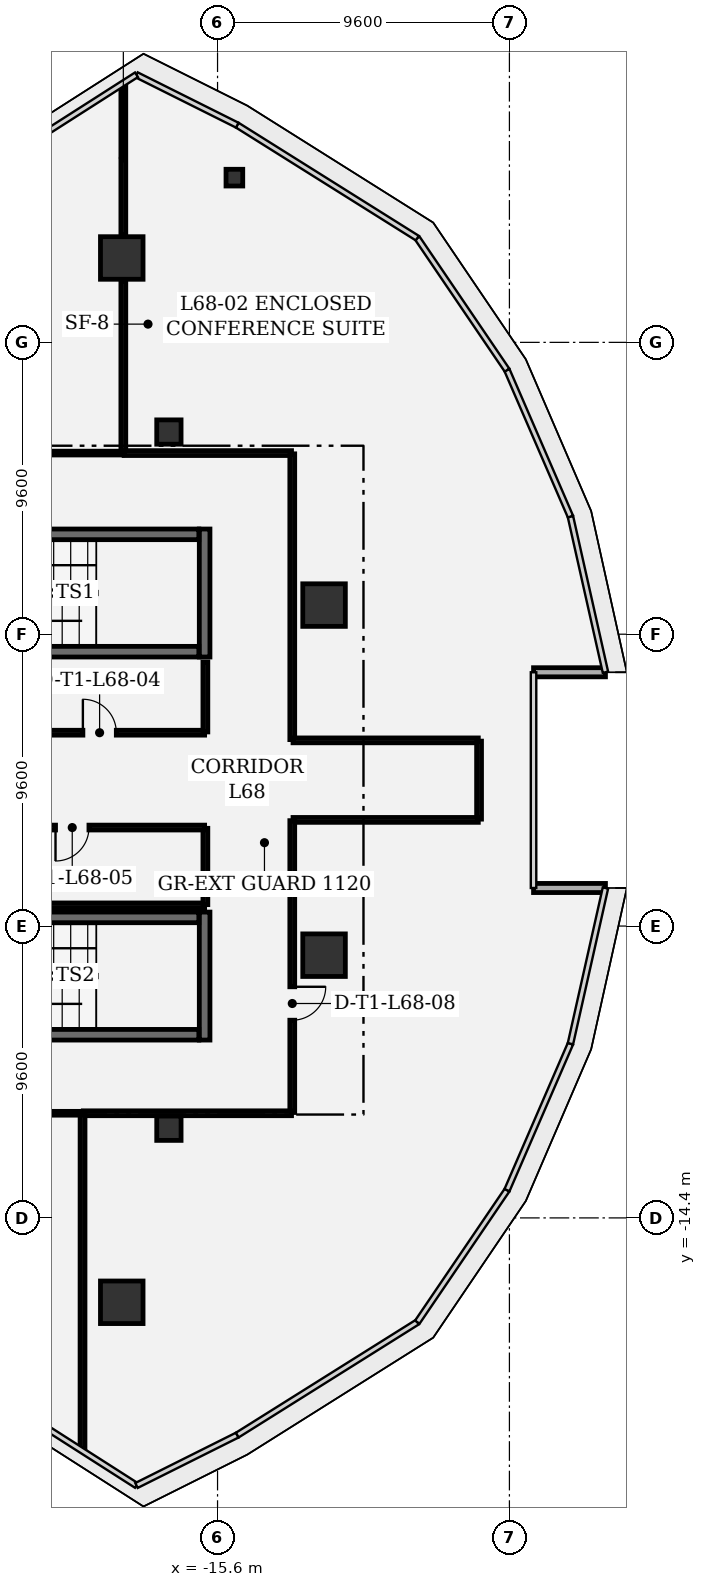
"""IFC4 building model, lengths in metres.
Left out: names, types, materials, properties, quantities, classifications, styles, units other than length and angle.
Written with IfcOpenShell. Run it as: python <this file> out.ifc"""

import sys

from ifc_helpers import new_model, si_unit, direction, frame, frame_2d, origin, origin_2d, place, context, subcontext, project, spatial, rectangle, extrude, element, fill, save


model = new_model("IFC4")
c1 = context("Model", 3, precision=1e-05, world=origin(), true_north=direction((0.0, 1.0)))
c2 = subcontext(c1, "Body", "Model", "MODEL_VIEW")
j1 = project(units=[si_unit("LENGTHUNIT", "METRE"), si_unit("PLANEANGLEUNIT", "RADIAN")], contexts=[c1])
p1 = place(None, origin())
s1 = spatial("IfcSite", under=j1, at=p1, CompositionType="ELEMENT")
p2 = place(p1, origin())
s2 = spatial("IfcBuilding", under=s1, at=p2, CompositionType="ELEMENT")
p3 = place(p2, frame((0.0, 0.0, 293.4)))
s3 = spatial("IfcBuildingStorey", under=s2, at=p3, CompositionType="ELEMENT", Elevation=293.4)
for number, where, z_axis, x_axis in (
    (1, (-18.75, -17.176, 0.0), (0.0, 0.0, 1.0), (1.0, 0.0, 0.0)),
    (2, (-12.097, -5.758, 0.0), (0.0, 0.0, 1.0), (1.0, 0.0, 0.0)),
    (3, (-12.097, 5.758, 0.0), (0.0, 0.0, 1.0), (1.0, 0.0, 0.0)),
    (4, (-18.75, 17.176, 0.0), (0.0, 0.0, 1.0), (1.0, 0.0, 0.0)),
):
    element("IfcColumn", number, at=place(p3, frame(where, z_axis=z_axis, x_axis=x_axis)), inside=s3, PredefinedType="COLUMN", context=c2, shape_type="SweptSolid", body=[
        extrude(rectangle(XDim=1.4, YDim=1.4, at=origin_2d()), origin(), (0.0, 0.0, 1.0), 4.2),
    ])
for number, where, z_axis, x_axis in (
    (5, (-17.2, 11.45, 0.0), (0.0, 0.0, 1.0), (1.0, 0.0, 0.0)),
    (6, (-17.2, -11.45, 0.0), (0.0, 0.0, 1.0), (1.0, 0.0, 0.0)),
):
    element("IfcColumn", number, at=place(p3, frame(where, z_axis=z_axis, x_axis=x_axis)), inside=s3, PredefinedType="COLUMN", context=c2, shape_type="SweptSolid", body=[
        extrude(rectangle(XDim=0.8, YDim=0.8, at=origin_2d()), origin(), (0.0, 0.0, 1.0), 4.2),
    ])
p4 = place(p3, frame((-15.046, 19.818, 0.0), z_axis=(0.0, 0.0, 1.0), x_axis=(1.0, 0.0, 0.0)))
e7 = element("IfcColumn", 7, at=p4, inside=s3, PredefinedType="COLUMN", context=c2, shape_type="SweptSolid", body=[
    extrude(rectangle(XDim=0.55, YDim=0.55, at=origin_2d()), origin(), (0.0, 0.0, 1.0), 4.2),
])
for number, where, z_axis, x_axis in (
    (8, (-2.841, -3.548, 0.0), (0.0, 0.0, 1.0), (-1.0, 0.0, 0.0)),
    (9, (-5.206, 3.548, 0.0), (0.0, 0.0, 1.0), (1.0, 0.0, 0.0)),
):
    element("IfcWall", number, at=place(p3, frame(where, z_axis=z_axis, x_axis=x_axis)), inside=s3, PredefinedType="SOLIDWALL", context=c2, shape_type="SweptSolid", body=[
        extrude(rectangle(XDim=2.365, YDim=0.3, at=frame_2d((1.183, 0.0))), origin(), (0.0, 0.0, 1.0), 3.91),
    ])
p5 = place(p3, frame((-16.025, 4.05, 0.0), z_axis=(0.0, 0.0, 1.0), x_axis=(0.0, 1.0, 0.0)))
e10 = element("IfcWall", 10, at=p5, inside=s3, PredefinedType="SHEAR", context=c2, shape_type="SweptSolid", body=[
    extrude(rectangle(XDim=4.21, YDim=0.35, at=frame_2d((2.105, 0.0))), origin(), (0.0, 0.0, 1.0), 3.91),
])
p6 = place(p3, frame((-24.335, 4.225, 0.0), z_axis=(0.0, 0.0, 1.0), x_axis=(1.0, 0.0, 0.0)))
e11 = element("IfcWall", 11, at=p6, inside=s3, PredefinedType="SHEAR", context=c2, shape_type="SweptSolid", body=[
    extrude(rectangle(XDim=8.12, YDim=0.35, at=frame_2d((4.06, 0.0))), origin(), (0.0, 0.0, 1.0), 3.91),
])
p7 = place(p3, frame((-16.215, 8.085, 0.0), z_axis=(0.0, 0.0, 1.0), x_axis=(-1.0, 0.0, 0.0)))
e12 = element("IfcWall", 12, at=p7, inside=s3, PredefinedType="SHEAR", context=c2, shape_type="SweptSolid", body=[
    extrude(rectangle(XDim=8.12, YDim=0.35, at=frame_2d((4.06, 0.0))), origin(), (0.0, 0.0, 1.0), 3.91),
])
p8 = place(p7, frame((6.74, 0.0, 0.0)))
e13 = element("IfcOpeningElement", 13, at=p8, cuts=e12, PredefinedType="OPENING", context=c2, shape_type="SweptSolid", body=[
    extrude(rectangle(XDim=1.1, YDim=2.2, at=frame_2d((0.55, 1.1))), frame((0.0, 0.185, 0.0), z_axis=(0.0, -1.0, 0.0), x_axis=(1.0, 0.0, 0.0)), (0.0, 0.0, 1.0), 0.37),
])
p9 = place(p3, frame((-16.025, -8.55, 0.0), z_axis=(0.0, 0.0, 1.0), x_axis=(0.0, 1.0, 0.0)))
e14 = element("IfcWall", 14, at=p9, inside=s3, PredefinedType="SHEAR", context=c2, shape_type="SweptSolid", body=[
    extrude(rectangle(XDim=4.21, YDim=0.35, at=frame_2d((2.105, 0.0))), origin(), (0.0, 0.0, 1.0), 3.91),
])
p10 = place(p3, frame((-24.335, -8.375, 0.0), z_axis=(0.0, 0.0, 1.0), x_axis=(1.0, 0.0, 0.0)))
e15 = element("IfcWall", 15, at=p10, inside=s3, PredefinedType="SHEAR", context=c2, shape_type="SweptSolid", body=[
    extrude(rectangle(XDim=8.12, YDim=0.35, at=frame_2d((4.06, 0.0))), origin(), (0.0, 0.0, 1.0), 3.91),
])
p11 = place(p10, frame((0.28, 0.0, 0.0)))
e16 = element("IfcOpeningElement", 16, at=p11, cuts=e15, PredefinedType="OPENING", context=c2, shape_type="SweptSolid", body=[
    extrude(rectangle(XDim=1.1, YDim=2.2, at=frame_2d((0.55, 1.1))), frame((0.0, 0.185, 0.0), z_axis=(0.0, -1.0, 0.0), x_axis=(1.0, 0.0, 0.0)), (0.0, 0.0, 1.0), 0.37),
])
p12 = place(p3, frame((-16.215, -4.515, 0.0), z_axis=(0.0, 0.0, 1.0), x_axis=(-1.0, 0.0, 0.0)))
e17 = element("IfcWall", 17, at=p12, inside=s3, PredefinedType="SHEAR", context=c2, shape_type="SweptSolid", body=[
    extrude(rectangle(XDim=8.12, YDim=0.35, at=frame_2d((4.06, 0.0))), origin(), (0.0, 0.0, 1.0), 3.91),
])
p13 = place(p3, frame((-22.934, 1.56, 0.0), z_axis=(0.0, 0.0, 1.0), x_axis=(1.0, 0.0, 0.0)))
e18 = element("IfcWall", 18, at=p13, inside=s3, PredefinedType="PARTITIONING", context=c2, shape_type="SweptSolid", body=[
    extrude(rectangle(XDim=6.909, YDim=0.16, at=frame_2d((3.455, 0.0))), origin(), (0.0, 0.0, 1.0), 3.91),
])
p14 = place(p13, frame((2.905, 0.0, 0.0)))
e19 = element("IfcOpeningElement", 19, at=p14, cuts=e18, PredefinedType="OPENING", context=c2, shape_type="SweptSolid", body=[
    extrude(rectangle(XDim=1.1, YDim=2.15, at=frame_2d((0.55, 1.075))), frame((0.0, 0.09, 0.0), z_axis=(0.0, -1.0, 0.0), x_axis=(1.0, 0.0, 0.0)), (0.0, 0.0, 1.0), 0.18),
])
p15 = place(p3, frame((-16.0, 1.585, 0.0), z_axis=(0.0, 0.0, 1.0), x_axis=(0.0, 1.0, 0.0)))
e20 = element("IfcWall", 20, at=p15, inside=s3, PredefinedType="PARTITIONING", context=c2, shape_type="SweptSolid", body=[
    extrude(rectangle(XDim=2.302, YDim=0.16, at=frame_2d((1.151, 0.0))), origin(), (0.0, 0.0, 1.0), 3.91),
])
p16 = place(p3, frame((-28.575, -4.12, 0.0), z_axis=(0.0, 0.0, 1.0), x_axis=(1.0, 0.0, 0.0)))
e21 = element("IfcWall", 21, at=p16, inside=s3, PredefinedType="PARTITIONING", context=c2, shape_type="SweptSolid", body=[
    extrude(rectangle(XDim=12.55, YDim=0.16, at=frame_2d((6.275, 0.0))), origin(), (0.0, 0.0, 1.0), 3.91),
])
p17 = place(p3, frame((-16.0, -4.095, 0.0), z_axis=(0.0, 0.0, 1.0), x_axis=(0.0, 1.0, 0.0)))
e22 = element("IfcWall", 22, at=p17, inside=s3, PredefinedType="PARTITIONING", context=c2, shape_type="SweptSolid", body=[
    extrude(rectangle(XDim=2.51, YDim=0.16, at=frame_2d((1.255, 0.0))), origin(), (0.0, 0.0, 1.0), 3.91),
])
p18 = place(p3, frame((-16.025, -1.56, 0.0), z_axis=(0.0, 0.0, 1.0), x_axis=(-1.0, 0.0, 0.0)))
e23 = element("IfcWall", 23, at=p18, inside=s3, PredefinedType="PARTITIONING", context=c2, shape_type="SweptSolid", body=[
    extrude(rectangle(XDim=8.709, YDim=0.16, at=frame_2d((4.354, 0.0))), origin(), (0.0, 0.0, 1.0), 3.91),
])
p19 = place(p18, frame((3.804, 0.0, 0.0)))
e24 = element("IfcOpeningElement", 24, at=p19, cuts=e23, PredefinedType="OPENING", context=c2, shape_type="SweptSolid", body=[
    extrude(rectangle(XDim=1.1, YDim=2.15, at=frame_2d((0.55, 1.075))), frame((0.0, 0.09, 0.0), z_axis=(0.0, -1.0, 0.0), x_axis=(1.0, 0.0, 0.0)), (0.0, 0.0, 1.0), 0.18),
])
p20 = place(p3, frame((-18.699, 22.845, 0.0), z_axis=(0.0, 0.0, 1.0), x_axis=(4.9780964e-05, -0.999999998761, 0.0)))
e25 = element("IfcWall", 25, at=p20, inside=s3, PredefinedType="PARTITIONING", context=c2, shape_type="SweptSolid", body=[
    extrude(rectangle(XDim=4.904, YDim=0.16, at=frame_2d((2.452, 0.0))), origin(), (0.0, 0.0, 1.0), 3.91),
])
p21 = place(p3, frame((-18.698, 16.411, 0.0), z_axis=(0.0, 0.0, 1.0), x_axis=(-4.3383948e-05, -0.999999999059, 0.0)))
e26 = element("IfcWall", 26, at=p21, inside=s3, PredefinedType="PARTITIONING", context=c2, shape_type="SweptSolid", body=[
    extrude(rectangle(XDim=5.627, YDim=0.16, at=frame_2d((2.814, 0.0))), origin(), (0.0, 0.0, 1.0), 3.13),
])
p22 = place(p3, frame((-13.167, 10.758, 0.0), z_axis=(0.0, 0.0, 1.0), x_axis=(-1.0, 0.0, 0.0)))
e27 = element("IfcWall", 27, at=p22, inside=s3, PredefinedType="PARTITIONING", context=c2, shape_type="SweptSolid", body=[
    extrude(rectangle(XDim=5.507, YDim=0.16, at=frame_2d((2.753, 0.0))), origin(), (0.0, 0.0, 1.0), 3.529),
])
p23 = place(p3, frame((-13.142, 10.733, 0.0), z_axis=(0.0, 0.0, 1.0), x_axis=(0.0, -1.0, 0.0)))
e28 = element("IfcWall", 28, at=p23, inside=s3, PredefinedType="PARTITIONING", context=c2, shape_type="SweptSolid", body=[
    extrude(rectangle(XDim=9.4, YDim=0.16, at=frame_2d((4.7, 0.0))), origin(), (0.0, 0.0, 1.0), 3.13),
])
p24 = place(p3, frame((-7.023, 1.308, 0.0), z_axis=(0.0, 0.0, 1.0), x_axis=(-1.0, 0.0, 0.0)))
e29 = element("IfcWall", 29, at=p24, inside=s3, PredefinedType="PARTITIONING", context=c2, shape_type="SweptSolid", body=[
    extrude(rectangle(XDim=6.094, YDim=0.16, at=frame_2d((3.047, 0.0))), origin(), (0.0, 0.0, 1.0), 3.91),
])
p25 = place(p3, frame((-6.998, -1.283, 0.0), z_axis=(0.0, 0.0, 1.0), x_axis=(0.0, 1.0, 0.0)))
e30 = element("IfcWall", 30, at=p25, inside=s3, PredefinedType="PARTITIONING", context=c2, shape_type="SweptSolid", body=[
    extrude(rectangle(XDim=2.566, YDim=0.16, at=frame_2d((1.283, 0.0))), origin(), (0.0, 0.0, 1.0), 3.91),
])
p26 = place(p3, frame((-13.117, -1.308, 0.0), z_axis=(0.0, 0.0, 1.0), x_axis=(1.0, 0.0, 0.0)))
e31 = element("IfcWall", 31, at=p26, inside=s3, PredefinedType="PARTITIONING", context=c2, shape_type="SweptSolid", body=[
    extrude(rectangle(XDim=6.094, YDim=0.16, at=frame_2d((3.047, 0.0))), origin(), (0.0, 0.0, 1.0), 3.91),
])
p27 = place(p3, frame((-13.142, -1.333, 0.0), z_axis=(0.0, 0.0, 1.0), x_axis=(0.0, -1.0, 0.0)))
e32 = element("IfcWall", 32, at=p27, inside=s3, PredefinedType="PARTITIONING", context=c2, shape_type="SweptSolid", body=[
    extrude(rectangle(XDim=9.6, YDim=0.16, at=frame_2d((4.8, 0.0))), origin(), (0.0, 0.0, 1.0), 3.13),
])
p28 = place(p27, frame((5.464, 0.0, 0.0)))
e33 = element("IfcOpeningElement", 33, at=p28, cuts=e32, PredefinedType="OPENING", context=c2, shape_type="SweptSolid", body=[
    extrude(rectangle(XDim=1.1, YDim=2.15, at=frame_2d((0.55, 1.075))), frame((0.0, 0.09, 0.0), z_axis=(0.0, -1.0, 0.0), x_axis=(1.0, 0.0, 0.0)), (0.0, 0.0, 1.0), 0.18),
])
p29 = place(p3, frame((-20.015, -10.958, 0.0), z_axis=(0.0, 0.0, 1.0), x_axis=(1.0, 0.0, 0.0)))
e34 = element("IfcWall", 34, at=p29, inside=s3, PredefinedType="PARTITIONING", context=c2, shape_type="SweptSolid", body=[
    extrude(rectangle(XDim=6.848, YDim=0.16, at=frame_2d((3.424, 0.0))), origin(), (0.0, 0.0, 1.0), 3.529),
])
p30 = place(p3, frame((-20.04, -10.983, 0.0), z_axis=(0.0, 0.0, 1.0), x_axis=(-0.00013312034, -0.999999991139, 0.0)))
e35 = element("IfcWall", 35, at=p30, inside=s3, PredefinedType="PARTITIONING", context=c2, shape_type="SweptSolid", body=[
    extrude(rectangle(XDim=11.004, YDim=0.16, at=frame_2d((5.502, 0.0))), origin(), (0.0, 0.0, 1.0), 3.91),
])
p31 = place(p3, frame((-29.15, 10.758, 0.0), z_axis=(0.0, 0.0, 1.0), x_axis=(1.0, 0.0, 0.0)))
e36 = element("IfcWall", 36, at=p31, inside=s3, PredefinedType="PARTITIONING", context=c2, shape_type="SweptSolid", body=[
    extrude(rectangle(XDim=10.419, YDim=0.125, at=frame_2d((5.209, 0.0))), origin(), (0.0, 0.0, 1.0), 3.13),
])
p32 = place(p31, frame((3.382, 0.0, 0.0)))
e37 = element("IfcOpeningElement", 37, at=p32, cuts=e36, PredefinedType="OPENING", context=c2, shape_type="SweptSolid", body=[
    extrude(rectangle(XDim=0.95, YDim=2.15, at=frame_2d((0.475, 1.075))), frame((0.0, 0.073, 0.0), z_axis=(0.0, -1.0, 0.0), x_axis=(1.0, 0.0, 0.0)), (0.0, 0.0, 1.0), 0.145),
])
p33 = place(p3, frame((-20.073, -10.958, 0.0), z_axis=(0.0, 0.0, 1.0), x_axis=(-1.0, 0.0, 0.0)))
e38 = element("IfcWall", 38, at=p33, inside=s3, PredefinedType="PARTITIONING", context=c2, shape_type="SweptSolid", body=[
    extrude(rectangle(XDim=9.811, YDim=0.125, at=frame_2d((4.905, 0.0))), origin(), (0.0, 0.0, 1.0), 3.13),
])
p34 = place(p33, frame((4.43, 0.0, 0.0)))
e39 = element("IfcOpeningElement", 39, at=p34, cuts=e38, PredefinedType="OPENING", context=c2, shape_type="SweptSolid", body=[
    extrude(rectangle(XDim=0.95, YDim=2.15, at=frame_2d((0.475, 1.075))), frame((0.0, 0.073, 0.0), z_axis=(0.0, -1.0, 0.0), x_axis=(1.0, 0.0, 0.0)), (0.0, 0.0, 1.0), 0.145),
])
p35 = place(p14, origin())
e40 = element("IfcDoor", 40, at=p35, inside=s3, OperationType="SINGLE_SWING_LEFT", PredefinedType="DOOR", context=c2, shape_type="SweptSolid", body=[
    extrude(rectangle(XDim=1.1, YDim=2.15, at=frame_2d((0.55, 1.075))), frame((0.0, 0.025, 0.0), z_axis=(0.0, -1.0, 0.0), x_axis=(1.0, 0.0, 0.0)), (0.0, 0.0, 1.0), 0.05),
])
fill(e19, e40)
p36 = place(p19, origin())
e41 = element("IfcDoor", 41, at=p36, inside=s3, OperationType="SINGLE_SWING_RIGHT", PredefinedType="DOOR", context=c2, shape_type="SweptSolid", body=[
    extrude(rectangle(XDim=1.1, YDim=2.15, at=frame_2d((0.55, 1.075))), frame((0.0, 0.025, 0.0), z_axis=(0.0, -1.0, 0.0), x_axis=(1.0, 0.0, 0.0)), (0.0, 0.0, 1.0), 0.05),
])
fill(e24, e41)
p37 = place(p28, origin())
e42 = element("IfcDoor", 42, at=p37, inside=s3, OperationType="SINGLE_SWING_LEFT", PredefinedType="DOOR", context=c2, shape_type="SweptSolid", body=[
    extrude(rectangle(XDim=1.1, YDim=2.15, at=frame_2d((0.55, 1.075))), frame((0.0, 0.025, 0.0), z_axis=(0.0, -1.0, 0.0), x_axis=(1.0, 0.0, 0.0)), (0.0, 0.0, 1.0), 0.05),
])
fill(e33, e42)
save(model, sys.argv[1])
